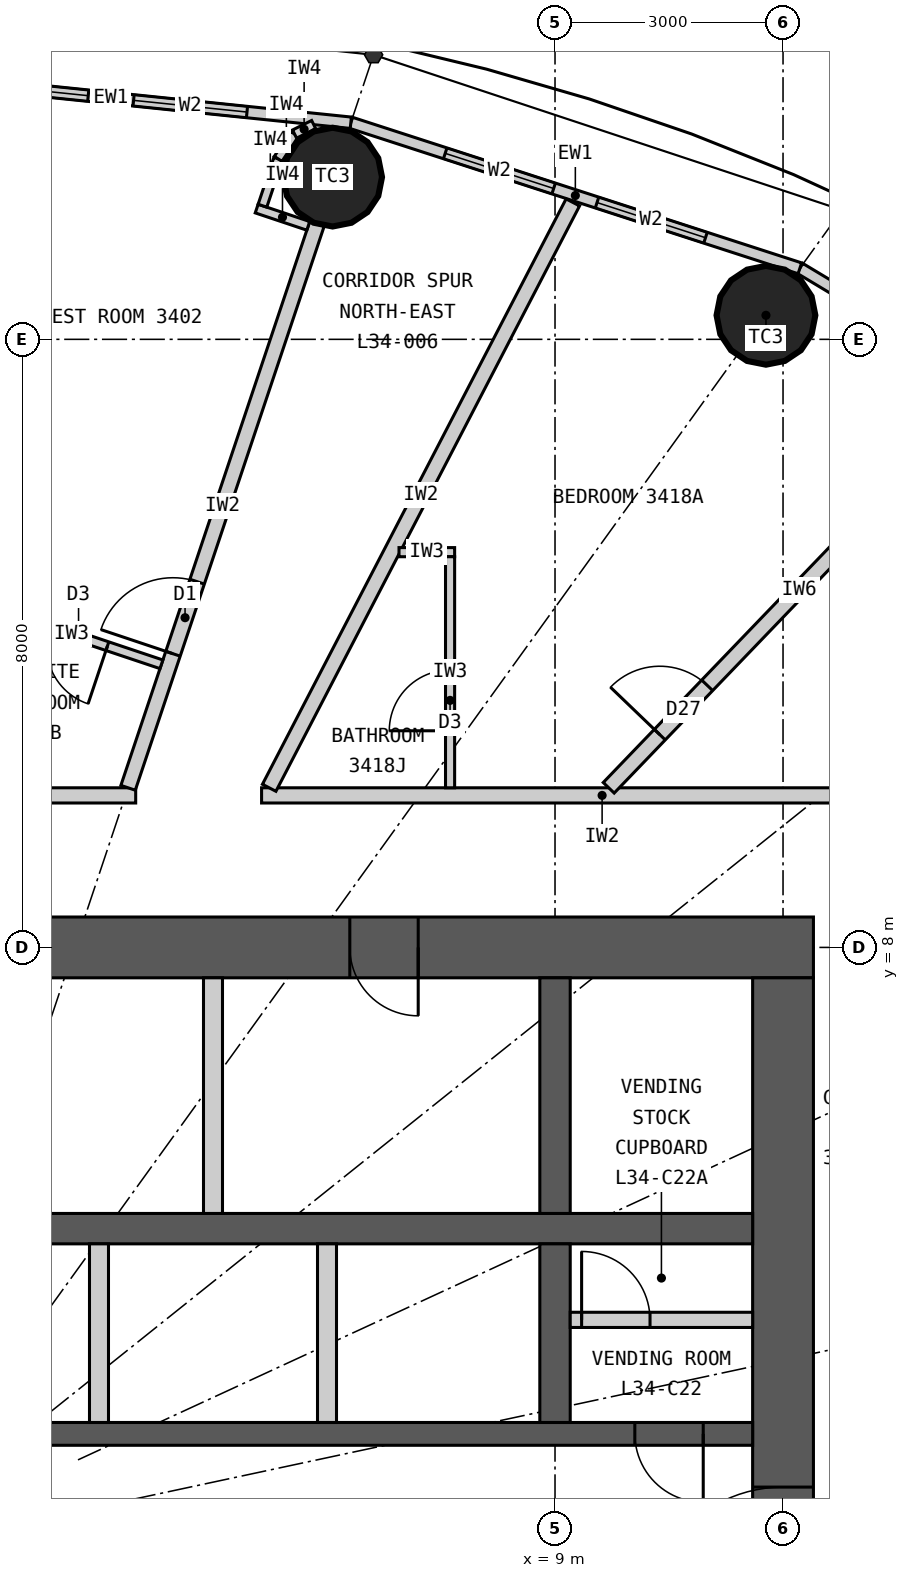
"""IFC4 building model, lengths in metres.
Left out: names, types, materials, properties, quantities, classifications, styles, units other than length and angle.
Written with IfcOpenShell. Run it as: python <this file> out.ifc"""

import sys

from ifc_helpers import new_model, si_unit, direction, frame, frame_2d, origin, origin_2d, place, context, subcontext, project, spatial, rectangle, circle, extrude, element, fill, save


model = new_model("IFC4")
c1 = context("Model", 3, precision=1e-05, world=origin(), true_north=direction((0.0, 1.0)))
c2 = subcontext(c1, "Body", "Model", "MODEL_VIEW")
j1 = project(units=[si_unit("LENGTHUNIT", "METRE"), si_unit("PLANEANGLEUNIT", "RADIAN")], contexts=[c1])
p1 = place(None, origin())
s1 = spatial("IfcSite", under=j1, at=p1, CompositionType="ELEMENT")
p2 = place(p1, origin())
s2 = spatial("IfcBuilding", under=s1, at=p2, CompositionType="ELEMENT")
p3 = place(p2, frame((0.0, 0.0, 132.0)))
s3 = spatial("IfcBuildingStorey", under=s2, at=p3, CompositionType="ELEMENT", Elevation=132.0)
for number, where, z_axis, x_axis in (
    (1, (11.775, 16.316, 0.0), (0.0, 0.0, 1.0), (1.0, 0.0, 0.0)),
    (2, (6.074, 18.135, 0.0), (0.0, 0.0, 1.0), (1.0, 0.0, 0.0)),
):
    element("IfcColumn", number, at=place(p3, frame(where, z_axis=z_axis, x_axis=x_axis)), inside=s3, PredefinedType="COLUMN", context=c2, shape_type="SweptSolid", body=[
        extrude(circle(Radius=0.65, at=origin_2d()), origin(), (0.0, 0.0, 1.0), 3.3),
    ])
p4 = place(p3, frame((-12.4, 8.0, 0.0), z_axis=(0.0, 0.0, 1.0), x_axis=(1.0, 0.0, 0.0)))
e3 = element("IfcWall", 3, at=p4, inside=s3, PredefinedType="SHEAR", context=c2, shape_type="SweptSolid", body=[
    extrude(rectangle(XDim=24.8, YDim=0.8, at=frame_2d((12.4, 0.0))), origin(), (0.0, 0.0, 1.0), 3.3),
])
p5 = place(p4, frame((11.1, 0.0, 0.0)))
e4 = element("IfcOpeningElement", 4, at=p5, cuts=e3, PredefinedType="OPENING", context=c2, shape_type="SweptSolid", body=[
    extrude(rectangle(XDim=1.2, YDim=2.2, at=frame_2d((0.6, 1.1))), frame((0.0, 0.41, 0.0), z_axis=(0.0, -1.0, 0.0), x_axis=(1.0, 0.0, 0.0)), (0.0, 0.0, 1.0), 0.82),
])
p6 = place(p4, frame((18.7, 0.0, 0.0)))
e5 = element("IfcOpeningElement", 5, at=p6, cuts=e3, PredefinedType="OPENING", context=c2, shape_type="SweptSolid", body=[
    extrude(rectangle(XDim=0.9, YDim=2.2, at=frame_2d((0.45, 1.1))), frame((0.0, 0.41, 0.0), z_axis=(0.0, -1.0, 0.0), x_axis=(1.0, 0.0, 0.0)), (0.0, 0.0, 1.0), 0.82),
])
p7 = place(p3, frame((12.0, -7.6, 0.0), z_axis=(0.0, 0.0, 1.0), x_axis=(0.0, 1.0, 0.0)))
e6 = element("IfcWall", 6, at=p7, inside=s3, PredefinedType="SHEAR", context=c2, shape_type="SweptSolid", body=[
    extrude(rectangle(XDim=15.2, YDim=0.8, at=frame_2d((7.6, 0.0))), origin(), (0.0, 0.0, 1.0), 3.3),
])
p8 = place(p7, frame((6.7, 0.0, 0.0)))
e7 = element("IfcOpeningElement", 7, at=p8, cuts=e6, PredefinedType="OPENING", context=c2, shape_type="SweptSolid", body=[
    extrude(rectangle(XDim=1.8, YDim=2.2, at=frame_2d((0.9, 1.1))), frame((0.0, 0.41, 0.0), z_axis=(0.0, -1.0, 0.0), x_axis=(1.0, 0.0, 0.0)), (0.0, 0.0, 1.0), 0.82),
])
p9 = place(p3, frame((-11.6, 4.3, 0.0), z_axis=(0.0, 0.0, 1.0), x_axis=(1.0, 0.0, 0.0)))
e8 = element("IfcWall", 8, at=p9, inside=s3, PredefinedType="SHEAR", context=c2, shape_type="SweptSolid", body=[
    extrude(rectangle(XDim=23.2, YDim=0.4, at=frame_2d((11.6, 0.0))), origin(), (0.0, 0.0, 1.0), 3.3),
])
p10 = place(p3, frame((-11.6, 1.6, 0.0), z_axis=(0.0, 0.0, 1.0), x_axis=(1.0, 0.0, 0.0)))
e9 = element("IfcWall", 9, at=p10, inside=s3, PredefinedType="SHEAR", context=c2, shape_type="SweptSolid", body=[
    extrude(rectangle(XDim=23.2, YDim=0.3, at=frame_2d((11.6, 0.0))), origin(), (0.0, 0.0, 1.0), 3.3),
])
p11 = place(p10, frame((6.55, 0.0, 0.0)))
e10 = element("IfcOpeningElement", 10, at=p11, cuts=e9, PredefinedType="OPENING", context=c2, shape_type="SweptSolid", body=[
    extrude(rectangle(XDim=1.1, YDim=2.2, at=frame_2d((0.55, 1.1))), frame((0.0, 0.16, 0.0), z_axis=(0.0, -1.0, 0.0), x_axis=(1.0, 0.0, 0.0)), (0.0, 0.0, 1.0), 0.32),
])
p12 = place(p10, frame((3.65, 0.0, 0.0)))
e11 = element("IfcOpeningElement", 11, at=p12, cuts=e9, PredefinedType="OPENING", context=c2, shape_type="SweptSolid", body=[
    extrude(rectangle(XDim=0.9, YDim=2.2, at=frame_2d((0.45, 1.1))), frame((0.0, 0.16, 0.0), z_axis=(0.0, -1.0, 0.0), x_axis=(1.0, 0.0, 0.0)), (0.0, 0.0, 1.0), 0.32),
])
p13 = place(p10, frame((21.65, 0.0, 0.0)))
e12 = element("IfcOpeningElement", 12, at=p13, cuts=e9, PredefinedType="OPENING", context=c2, shape_type="SweptSolid", body=[
    extrude(rectangle(XDim=0.9, YDim=2.2, at=frame_2d((0.45, 1.1))), frame((0.0, 0.16, 0.0), z_axis=(0.0, -1.0, 0.0), x_axis=(1.0, 0.0, 0.0)), (0.0, 0.0, 1.0), 0.32),
])
p14 = place(p10, frame((0.65, 0.0, 0.0)))
e13 = element("IfcOpeningElement", 13, at=p14, cuts=e9, PredefinedType="OPENING", context=c2, shape_type="SweptSolid", body=[
    extrude(rectangle(XDim=0.9, YDim=2.2, at=frame_2d((0.45, 1.1))), frame((0.0, 0.16, 0.0), z_axis=(0.0, -1.0, 0.0), x_axis=(1.0, 0.0, 0.0)), (0.0, 0.0, 1.0), 0.32),
])
p15 = place(p3, frame((9.0, 4.5, 0.0), z_axis=(0.0, 0.0, 1.0), x_axis=(0.0, 1.0, 0.0)))
e14 = element("IfcWall", 14, at=p15, inside=s3, PredefinedType="SHEAR", context=c2, shape_type="SweptSolid", body=[
    extrude(rectangle(XDim=3.1, YDim=0.4, at=frame_2d((1.55, 0.0))), origin(), (0.0, 0.0, 1.0), 3.3),
])
p16 = place(p3, frame((9.0, 1.75, 0.0), z_axis=(0.0, 0.0, 1.0), x_axis=(0.0, 1.0, 0.0)))
e15 = element("IfcWall", 15, at=p16, inside=s3, PredefinedType="SHEAR", context=c2, shape_type="SweptSolid", body=[
    extrude(rectangle(XDim=2.35, YDim=0.4, at=frame_2d((1.175, 0.0))), origin(), (0.0, 0.0, 1.0), 3.3),
])
p17 = place(p3, frame((4.5, 4.5, 0.0), z_axis=(0.0, 0.0, 1.0), x_axis=(0.0, 1.0, 0.0)))
e16 = element("IfcWall", 16, at=p17, inside=s3, PredefinedType="PARTITIONING", context=c2, shape_type="SweptSolid", body=[
    extrude(rectangle(XDim=3.1, YDim=0.25, at=frame_2d((1.55, 0.0))), origin(), (0.0, 0.0, 1.0), 3.3),
])
for number, where, z_axis, x_axis in (
    (17, (3.0, 1.75, 0.0), (0.0, 0.0, 1.0), (0.0, 1.0, 0.0)),
    (18, (6.0, 1.75, 0.0), (0.0, 0.0, 1.0), (0.0, 1.0, 0.0)),
):
    element("IfcWall", number, at=place(p3, frame(where, z_axis=z_axis, x_axis=x_axis)), inside=s3, PredefinedType="PARTITIONING", context=c2, shape_type="SweptSolid", body=[
        extrude(rectangle(XDim=2.35, YDim=0.25, at=frame_2d((1.175, 0.0))), origin(), (0.0, 0.0, 1.0), 3.3),
    ])
p18 = place(p3, frame((17.332, 13.866, 0.0), z_axis=(0.0, 0.0, 1.0), x_axis=(-0.857308573723, 0.514802884044, 0.0)))
e19 = element("IfcWall", 19, at=p18, inside=s3, PredefinedType="ELEMENTEDWALL", context=c2, shape_type="SweptSolid", body=[
    extrude(rectangle(XDim=5.961, YDim=0.15, at=frame_2d((2.98, 0.0))), origin(), (0.0, 0.0, 1.0), 3.12),
])
p19 = place(p18, frame((1.181, 0.0, 0.9)))
e20 = element("IfcOpeningElement", 20, at=p19, cuts=e19, PredefinedType="OPENING", context=c2, shape_type="SweptSolid", body=[
    extrude(rectangle(XDim=1.5, YDim=1.9, at=frame_2d((0.75, 0.95))), frame((0.0, 0.085, 0.0), z_axis=(0.0, -1.0, 0.0), x_axis=(1.0, 0.0, 0.0)), (0.0, 0.0, 1.0), 0.17),
])
p20 = place(p18, frame((3.281, 0.0, 0.9)))
e21 = element("IfcOpeningElement", 21, at=p20, cuts=e19, PredefinedType="OPENING", context=c2, shape_type="SweptSolid", body=[
    extrude(rectangle(XDim=1.5, YDim=1.9, at=frame_2d((0.75, 0.95))), frame((0.0, 0.085, 0.0), z_axis=(0.0, -1.0, 0.0), x_axis=(1.0, 0.0, 0.0)), (0.0, 0.0, 1.0), 0.17),
])
p21 = place(p3, frame((12.221, 16.935, 0.0), z_axis=(0.0, 0.0, 1.0), x_axis=(-0.951272691506, 0.308350881944, 0.0)))
e22 = element("IfcWall", 22, at=p21, inside=s3, PredefinedType="ELEMENTEDWALL", context=c2, shape_type="SweptSolid", body=[
    extrude(rectangle(XDim=6.211, YDim=0.15, at=frame_2d((3.105, 0.0))), origin(), (0.0, 0.0, 1.0), 3.12),
])
p22 = place(p21, frame((1.305, 0.0, 0.9)))
e23 = element("IfcOpeningElement", 23, at=p22, cuts=e22, PredefinedType="OPENING", context=c2, shape_type="SweptSolid", body=[
    extrude(rectangle(XDim=1.5, YDim=1.9, at=frame_2d((0.75, 0.95))), frame((0.0, 0.085, 0.0), z_axis=(0.0, -1.0, 0.0), x_axis=(1.0, 0.0, 0.0)), (0.0, 0.0, 1.0), 0.17),
])
p23 = place(p21, frame((3.405, 0.0, 0.9)))
e24 = element("IfcOpeningElement", 24, at=p23, cuts=e22, PredefinedType="OPENING", context=c2, shape_type="SweptSolid", body=[
    extrude(rectangle(XDim=1.5, YDim=1.9, at=frame_2d((0.75, 0.95))), frame((0.0, 0.085, 0.0), z_axis=(0.0, -1.0, 0.0), x_axis=(1.0, 0.0, 0.0)), (0.0, 0.0, 1.0), 0.17),
])
p24 = place(p3, frame((6.313, 18.85, 0.0), z_axis=(0.0, 0.0, 1.0), x_axis=(-0.994735690163, 0.102473931887, 0.0)))
e25 = element("IfcWall", 25, at=p24, inside=s3, PredefinedType="ELEMENTEDWALL", context=c2, shape_type="SweptSolid", body=[
    extrude(rectangle(XDim=6.347, YDim=0.15, at=frame_2d((3.173, 0.0))), origin(), (0.0, 0.0, 1.0), 3.12),
])
p25 = place(p24, frame((1.373, 0.0, 0.9)))
e26 = element("IfcOpeningElement", 26, at=p25, cuts=e25, PredefinedType="OPENING", context=c2, shape_type="SweptSolid", body=[
    extrude(rectangle(XDim=1.5, YDim=1.9, at=frame_2d((0.75, 0.95))), frame((0.0, 0.085, 0.0), z_axis=(0.0, -1.0, 0.0), x_axis=(1.0, 0.0, 0.0)), (0.0, 0.0, 1.0), 0.17),
])
p26 = place(p24, frame((3.473, 0.0, 0.9)))
e27 = element("IfcOpeningElement", 27, at=p26, cuts=e25, PredefinedType="OPENING", context=c2, shape_type="SweptSolid", body=[
    extrude(rectangle(XDim=1.5, YDim=1.9, at=frame_2d((0.75, 0.95))), frame((0.0, 0.085, 0.0), z_axis=(0.0, -1.0, 0.0), x_axis=(1.0, 0.0, 0.0)), (0.0, 0.0, 1.0), 0.17),
])
p27 = place(p3, frame((-0.1, 10.0, 0.0), z_axis=(0.0, 0.0, 1.0), x_axis=(1.0, 0.0, 0.0)))
e28 = element("IfcWall", 28, at=p27, inside=s3, PredefinedType="PARTITIONING", context=c2, shape_type="SweptSolid", body=[
    extrude(rectangle(XDim=3.583, YDim=0.2, at=frame_2d((1.792, 0.0))), origin(), (0.0, 0.0, 1.0), 3.12),
])
p28 = place(p3, frame((5.139, 10.0, 0.0), z_axis=(0.0, 0.0, 1.0), x_axis=(1.0, 0.0, 0.0)))
e29 = element("IfcWall", 29, at=p28, inside=s3, PredefinedType="PARTITIONING", context=c2, shape_type="SweptSolid", body=[
    extrude(rectangle(XDim=8.961, YDim=0.2, at=frame_2d((4.48, 0.0))), origin(), (0.0, 0.0, 1.0), 3.12),
])
p29 = place(p3, frame((9.706, 10.1, 0.0), z_axis=(0.0, 0.0, 1.0), x_axis=(0.692944801824, 0.720990639069, 0.0)))
e30 = element("IfcWall", 30, at=p29, inside=s3, PredefinedType="PARTITIONING", context=c2, shape_type="SweptSolid", body=[
    extrude(rectangle(XDim=7.234, YDim=0.2, at=frame_2d((3.617, 0.0))), origin(), (0.0, 0.0, 1.0), 3.12),
])
p30 = place(p29, frame((0.97, 0.0, 0.0)))
e31 = element("IfcOpeningElement", 31, at=p30, cuts=e30, PredefinedType="OPENING", context=c2, shape_type="SweptSolid", body=[
    extrude(rectangle(XDim=0.9, YDim=2.1, at=frame_2d((0.45, 1.05))), frame((0.0, 0.11, 0.0), z_axis=(0.0, -1.0, 0.0), x_axis=(1.0, 0.0, 0.0)), (0.0, 0.0, 1.0), 0.22),
])
p31 = place(p3, frame((5.239, 10.1, 0.0), z_axis=(0.0, 0.0, 1.0), x_axis=(0.4604797896, 0.887670188398, 0.0)))
e32 = element("IfcWall", 32, at=p31, inside=s3, PredefinedType="PARTITIONING", context=c2, shape_type="SweptSolid", body=[
    extrude(rectangle(XDim=8.676, YDim=0.2, at=frame_2d((4.338, 0.0))), origin(), (0.0, 0.0, 1.0), 3.12),
])
p32 = place(p3, frame((3.383, 10.1, 0.0), z_axis=(0.0, 0.0, 1.0), x_axis=(0.317603705574, 0.948223542318, 0.0)))
e33 = element("IfcWall", 33, at=p32, inside=s3, PredefinedType="PARTITIONING", context=c2, shape_type="SweptSolid", body=[
    extrude(rectangle(XDim=7.823, YDim=0.2, at=frame_2d((3.912, 0.0))), origin(), (0.0, 0.0, 1.0), 2.27),
])
p33 = place(p32, frame((1.86, 0.0, 0.0)))
e34 = element("IfcOpeningElement", 34, at=p33, cuts=e33, PredefinedType="OPENING", context=c2, shape_type="SweptSolid", body=[
    extrude(rectangle(XDim=1.0, YDim=2.2, at=frame_2d((0.5, 1.1))), frame((0.0, 0.11, 0.0), z_axis=(0.0, -1.0, 0.0), x_axis=(1.0, 0.0, 0.0)), (0.0, 0.0, 1.0), 0.22),
])
p34 = place(p3, frame((3.822, 11.725, 0.0), z_axis=(0.0, 0.0, 1.0), x_axis=(-0.948231307998, 0.317580519761, 0.0)))
e35 = element("IfcWall", 35, at=p34, inside=s3, PredefinedType="PARTITIONING", context=c2, shape_type="SweptSolid", body=[
    extrude(rectangle(XDim=2.49, YDim=0.12, at=frame_2d((1.245, 0.0))), origin(), (0.0, 0.0, 1.0), 3.12),
])
p35 = place(p34, frame((0.75, 0.0, 0.0)))
e36 = element("IfcOpeningElement", 36, at=p35, cuts=e35, PredefinedType="OPENING", context=c2, shape_type="SweptSolid", body=[
    extrude(rectangle(XDim=0.8, YDim=2.1, at=frame_2d((0.4, 1.05))), frame((0.0, 0.07, 0.0), z_axis=(0.0, -1.0, 0.0), x_axis=(1.0, 0.0, 0.0)), (0.0, 0.0, 1.0), 0.14),
])
p36 = place(p3, frame((6.947, 13.2, 0.0), z_axis=(0.0, 0.0, 1.0), x_axis=(1.0, 0.0, 0.0)))
e37 = element("IfcWall", 37, at=p36, inside=s3, PredefinedType="PARTITIONING", context=c2, shape_type="SweptSolid", body=[
    extrude(rectangle(XDim=0.732, YDim=0.12, at=frame_2d((0.366, 0.0))), origin(), (0.0, 0.0, 1.0), 3.12),
])
p37 = place(p3, frame((7.619, 10.1, 0.0), z_axis=(0.0, 0.0, 1.0), x_axis=(0.0, 1.0, 0.0)))
e38 = element("IfcWall", 38, at=p37, inside=s3, PredefinedType="PARTITIONING", context=c2, shape_type="SweptSolid", body=[
    extrude(rectangle(XDim=3.04, YDim=0.12, at=frame_2d((1.52, 0.0))), origin(), (0.0, 0.0, 1.0), 3.12),
])
p38 = place(p37, frame((0.75, 0.0, 0.0)))
e39 = element("IfcOpeningElement", 39, at=p38, cuts=e38, PredefinedType="OPENING", context=c2, shape_type="SweptSolid", body=[
    extrude(rectangle(XDim=0.8, YDim=2.1, at=frame_2d((0.4, 1.05))), frame((0.0, 0.07, 0.0), z_axis=(0.0, -1.0, 0.0), x_axis=(1.0, 0.0, 0.0)), (0.0, 0.0, 1.0), 0.14),
])
p39 = place(p3, frame((9.2, 3.1, 0.0), z_axis=(0.0, 0.0, 1.0), x_axis=(1.0, 0.0, 0.0)))
e40 = element("IfcWall", 40, at=p39, inside=s3, PredefinedType="PARTITIONING", context=c2, shape_type="SweptSolid", body=[
    extrude(rectangle(XDim=2.4, YDim=0.2, at=frame_2d((1.2, 0.0))), origin(), (0.0, 0.0, 1.0), 3.12),
])
p40 = place(p39, frame((0.15, 0.0, 0.0)))
e41 = element("IfcOpeningElement", 41, at=p40, cuts=e40, PredefinedType="OPENING", context=c2, shape_type="SweptSolid", body=[
    extrude(rectangle(XDim=0.9, YDim=2.2, at=frame_2d((0.45, 1.1))), frame((0.0, 0.11, 0.0), z_axis=(0.0, -1.0, 0.0), x_axis=(1.0, 0.0, 0.0)), (0.0, 0.0, 1.0), 0.22),
])
p41 = place(p3, frame((5.754, 17.493, 0.0), z_axis=(0.0, 0.0, 1.0), x_axis=(-0.9482389443, 0.317557718397, 0.0)))
e42 = element("IfcWall", 42, at=p41, inside=s3, PredefinedType="PARTITIONING", context=c2, shape_type="SweptSolid", body=[
    extrude(rectangle(XDim=0.716, YDim=0.12, at=frame_2d((0.358, 0.0))), origin(), (0.0, 0.0, 1.0), 3.12),
])
p42 = place(p3, frame((5.151, 17.758, 0.0), z_axis=(0.0, 0.0, 1.0), x_axis=(0.317354244456, 0.948307061835, 0.0)))
e43 = element("IfcWall", 43, at=p42, inside=s3, PredefinedType="PARTITIONING", context=c2, shape_type="SweptSolid", body=[
    extrude(rectangle(XDim=0.65, YDim=0.12, at=frame_2d((0.325, 0.0))), origin(), (0.0, 0.0, 1.0), 3.12),
])
p43 = place(p3, frame((5.357, 18.375, 0.0), z_axis=(0.0, 0.0, 1.0), x_axis=(0.552249752128, 0.833678721856, 0.0)))
e44 = element("IfcWall", 44, at=p43, inside=s3, PredefinedType="PARTITIONING", context=c2, shape_type="SweptSolid", body=[
    extrude(rectangle(XDim=0.391, YDim=0.12, at=frame_2d((0.196, 0.0))), origin(), (0.0, 0.0, 1.0), 3.12),
])
p44 = place(p3, frame((5.573, 18.701, 0.0), z_axis=(0.0, 0.0, 1.0), x_axis=(0.895295561985, 0.445472621707, 0.0)))
e45 = element("IfcWall", 45, at=p44, inside=s3, PredefinedType="PARTITIONING", context=c2, shape_type="SweptSolid", body=[
    extrude(rectangle(XDim=0.281, YDim=0.12, at=frame_2d((0.14, 0.0))), origin(), (0.0, 0.0, 1.0), 3.12),
])
p45 = place(p22, origin())
e46 = element("IfcWindow", 46, at=p45, inside=s3, PartitioningType="SINGLE_PANEL", PredefinedType="WINDOW", context=c2, shape_type="SweptSolid", body=[
    extrude(rectangle(XDim=1.5, YDim=1.9, at=frame_2d((0.75, 0.95))), frame((0.0, 0.03, 0.0), z_axis=(0.0, -1.0, 0.0), x_axis=(1.0, 0.0, 0.0)), (0.0, 0.0, 1.0), 0.06),
])
fill(e23, e46)
p46 = place(p23, origin())
e47 = element("IfcWindow", 47, at=p46, inside=s3, PartitioningType="SINGLE_PANEL", PredefinedType="WINDOW", context=c2, shape_type="SweptSolid", body=[
    extrude(rectangle(XDim=1.5, YDim=1.9, at=frame_2d((0.75, 0.95))), frame((0.0, 0.03, 0.0), z_axis=(0.0, -1.0, 0.0), x_axis=(1.0, 0.0, 0.0)), (0.0, 0.0, 1.0), 0.06),
])
fill(e24, e47)
p47 = place(p25, origin())
e48 = element("IfcWindow", 48, at=p47, inside=s3, PartitioningType="SINGLE_PANEL", PredefinedType="WINDOW", context=c2, shape_type="SweptSolid", body=[
    extrude(rectangle(XDim=1.5, YDim=1.9, at=frame_2d((0.75, 0.95))), frame((0.0, 0.03, 0.0), z_axis=(0.0, -1.0, 0.0), x_axis=(1.0, 0.0, 0.0)), (0.0, 0.0, 1.0), 0.06),
])
fill(e26, e48)
p48 = place(p26, origin())
e49 = element("IfcWindow", 49, at=p48, inside=s3, PartitioningType="SINGLE_PANEL", PredefinedType="WINDOW", context=c2, shape_type="SweptSolid", body=[
    extrude(rectangle(XDim=1.5, YDim=1.9, at=frame_2d((0.75, 0.95))), frame((0.0, 0.03, 0.0), z_axis=(0.0, -1.0, 0.0), x_axis=(1.0, 0.0, 0.0)), (0.0, 0.0, 1.0), 0.06),
])
fill(e27, e49)
p49 = place(p35, origin())
e50 = element("IfcDoor", 50, at=p49, inside=s3, OperationType="SINGLE_SWING_LEFT", PredefinedType="DOOR", context=c2, shape_type="SweptSolid", body=[
    extrude(rectangle(XDim=0.8, YDim=2.1, at=frame_2d((0.4, 1.05))), frame((0.0, 0.025, 0.0), z_axis=(0.0, -1.0, 0.0), x_axis=(1.0, 0.0, 0.0)), (0.0, 0.0, 1.0), 0.05),
])
fill(e36, e50)
p50 = place(p33, origin())
e51 = element("IfcDoor", 51, at=p50, inside=s3, OperationType="SINGLE_SWING_LEFT", PredefinedType="DOOR", context=c2, shape_type="SweptSolid", body=[
    extrude(rectangle(XDim=1.0, YDim=2.2, at=frame_2d((0.5, 1.1))), frame((0.0, 0.025, 0.0), z_axis=(0.0, -1.0, 0.0), x_axis=(1.0, 0.0, 0.0)), (0.0, 0.0, 1.0), 0.05),
])
fill(e34, e51)
p51 = place(p38, origin())
e52 = element("IfcDoor", 52, at=p51, inside=s3, OperationType="SINGLE_SWING_LEFT", PredefinedType="DOOR", context=c2, shape_type="SweptSolid", body=[
    extrude(rectangle(XDim=0.8, YDim=2.1, at=frame_2d((0.4, 1.05))), frame((0.0, 0.025, 0.0), z_axis=(0.0, -1.0, 0.0), x_axis=(1.0, 0.0, 0.0)), (0.0, 0.0, 1.0), 0.05),
])
fill(e39, e52)
p52 = place(p30, origin())
e53 = element("IfcDoor", 53, at=p52, inside=s3, OperationType="SINGLE_SWING_LEFT", PredefinedType="DOOR", context=c2, shape_type="SweptSolid", body=[
    extrude(rectangle(XDim=0.9, YDim=2.1, at=frame_2d((0.45, 1.05))), frame((0.0, 0.025, 0.0), z_axis=(0.0, -1.0, 0.0), x_axis=(1.0, 0.0, 0.0)), (0.0, 0.0, 1.0), 0.05),
])
fill(e31, e53)
p53 = place(p6, origin())
e54 = element("IfcDoor", 54, at=p53, inside=s3, OperationType="SINGLE_SWING_RIGHT", PredefinedType="DOOR", context=c2, shape_type="SweptSolid", body=[
    extrude(rectangle(XDim=0.9, YDim=2.2, at=frame_2d((0.45, 1.1))), frame((0.0, 0.025, 0.0), z_axis=(0.0, -1.0, 0.0), x_axis=(1.0, 0.0, 0.0)), (0.0, 0.0, 1.0), 0.05),
])
fill(e5, e54)
p54 = place(p40, origin())
e55 = element("IfcDoor", 55, at=p54, inside=s3, OperationType="SINGLE_SWING_LEFT", PredefinedType="DOOR", context=c2, shape_type="SweptSolid", body=[
    extrude(rectangle(XDim=0.9, YDim=2.2, at=frame_2d((0.45, 1.1))), frame((0.0, 0.025, 0.0), z_axis=(0.0, -1.0, 0.0), x_axis=(1.0, 0.0, 0.0)), (0.0, 0.0, 1.0), 0.05),
])
fill(e41, e55)
p55 = place(p13, origin())
e56 = element("IfcDoor", 56, at=p55, inside=s3, OperationType="SINGLE_SWING_RIGHT", PredefinedType="DOOR", context=c2, shape_type="SweptSolid", body=[
    extrude(rectangle(XDim=0.9, YDim=2.2, at=frame_2d((0.45, 1.1))), frame((0.0, 0.025, 0.0), z_axis=(0.0, -1.0, 0.0), x_axis=(1.0, 0.0, 0.0)), (0.0, 0.0, 1.0), 0.05),
])
fill(e12, e56)
p56 = place(p8, origin())
e57 = element("IfcDoor", 57, at=p56, inside=s3, OperationType="DOUBLE_DOOR_DOUBLE_SWING", PredefinedType="DOOR", context=c2, shape_type="SweptSolid", body=[
    extrude(rectangle(XDim=1.8, YDim=2.2, at=frame_2d((0.9, 1.1))), frame((0.0, 0.025, 0.0), z_axis=(0.0, -1.0, 0.0), x_axis=(1.0, 0.0, 0.0)), (0.0, 0.0, 1.0), 0.05),
])
fill(e7, e57)
save(model, sys.argv[1])
